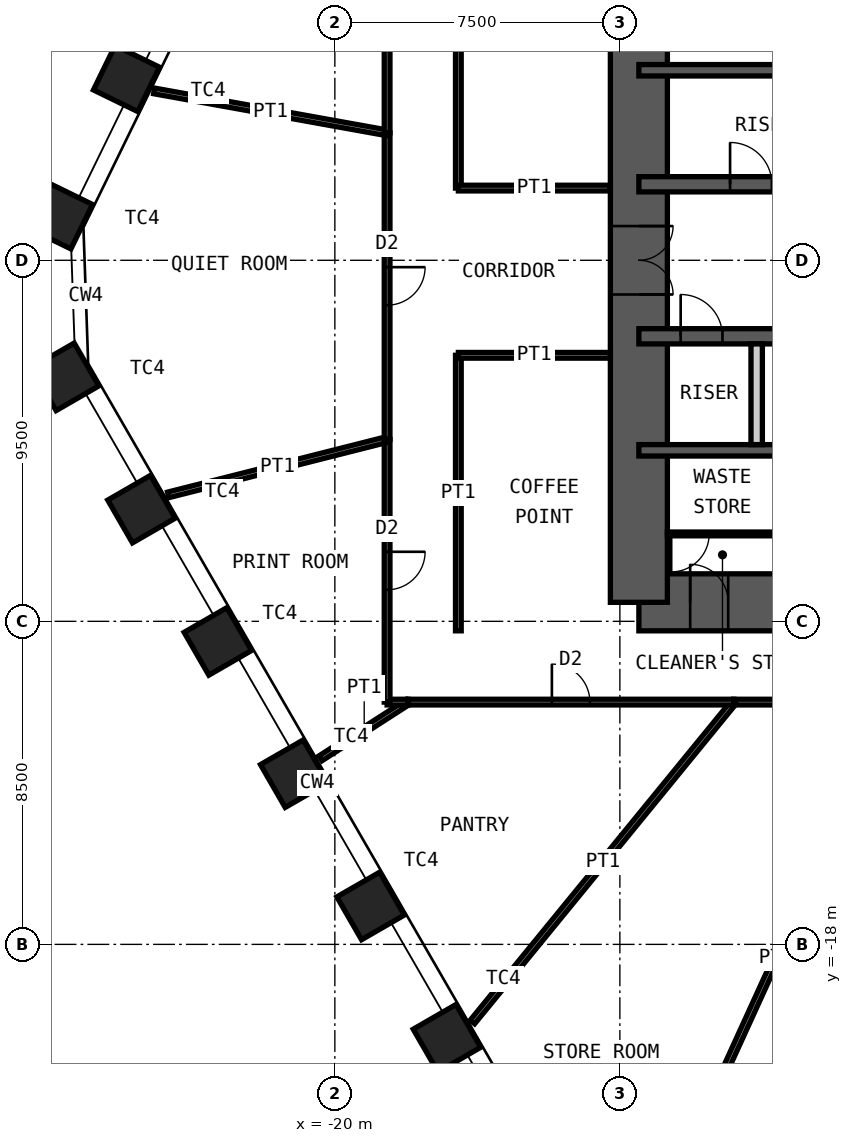
"""IFC4 building model, lengths in metres.
Left out: names, types, materials, properties, quantities, classifications, styles, units other than length and angle.
Written with IfcOpenShell. Run it as: python <this file> out.ifc"""

import sys

from ifc_helpers import new_model, si_unit, direction, frame, frame_2d, origin, origin_2d, place, context, subcontext, project, spatial, rectangle, hollow_rectangle, extrude, element, fill, save


model = new_model("IFC4")
c1 = context("Model", 3, precision=1e-05, world=origin(), true_north=direction((0.0, 1.0)))
c2 = subcontext(c1, "Body", "Model", "MODEL_VIEW")
j1 = project(units=[si_unit("LENGTHUNIT", "METRE"), si_unit("PLANEANGLEUNIT", "RADIAN")], contexts=[c1])
p1 = place(None, origin())
s1 = spatial("IfcSite", under=j1, at=p1, CompositionType="ELEMENT")
p2 = place(p1, origin())
s2 = spatial("IfcBuilding", under=s1, at=p2, CompositionType="ELEMENT")
p3 = place(p2, frame((0.0, 0.0, 157.6)))
s3 = spatial("IfcBuildingStorey", under=s2, at=p3, CompositionType="ELEMENT", Elevation=157.6)
for number, where, z_axis, x_axis in (
    (1, (-17.049, -20.47, 0.0), (0.0, 0.0, 1.0), (0.5, -0.866, 0.0)),
    (2, (-19.059, -16.989, 0.0), (0.0, 0.0, 1.0), (0.5, -0.866, 0.0)),
    (3, (-21.068, -13.509, 0.0), (0.0, 0.0, 1.0), (0.5, -0.866, 0.0)),
    (4, (-23.078, -10.028, 0.0), (0.0, 0.0, 1.0), (0.5, -0.866, 0.0)),
    (5, (-25.087, -6.547, 0.0), (0.0, 0.0, 1.0), (0.5, -0.866, 0.0)),
    (6, (-27.097, -3.067, 0.0), (0.0, 0.0, 1.0), (0.5, -0.866, 0.0)),
    (7, (-27.245, 1.169, 0.0), (0.0, 0.0, 1.0), (-0.438, -0.899, 0.0)),
    (8, (-25.483, 4.781, 0.0), (0.0, 0.0, 1.0), (-0.438, -0.899, 0.0)),
):
    element("IfcColumn", number, at=place(p3, frame(where, z_axis=z_axis, x_axis=x_axis)), inside=s3, PredefinedType="COLUMN", context=c2, shape_type="SweptSolid", body=[
        extrude(hollow_rectangle(XDim=1.3, YDim=1.3, WallThickness=0.1, at=origin_2d()), origin(), (0.0, 0.0, 1.0), 4.2),
    ])
p4 = place(p3, frame((-12.0, -9.0, 0.0), z_axis=(0.0, 0.0, 1.0), x_axis=(1.0, 0.0, 0.0)))
e9 = element("IfcWall", 9, at=p4, inside=s3, PredefinedType="SHEAR", context=c2, shape_type="SweptSolid", body=[
    extrude(rectangle(XDim=24.0, YDim=1.5, at=frame_2d((12.0, 0.0))), origin(), (0.0, 0.0, 1.0), 4.2),
])
p5 = place(p4, frame((1.35, 0.0, 0.0)))
e10 = element("IfcOpeningElement", 10, at=p5, cuts=e9, PredefinedType="OPENING", context=c2, shape_type="SweptSolid", body=[
    extrude(rectangle(XDim=1.0, YDim=2.1, at=frame_2d((0.5, 1.05))), frame((0.0, 0.76, 0.0), z_axis=(0.0, -1.0, 0.0), x_axis=(1.0, 0.0, 0.0)), (0.0, 0.0, 1.0), 1.52),
])
p6 = place(p4, frame((5.325, 0.0, 0.0)))
e11 = element("IfcOpeningElement", 11, at=p6, cuts=e9, PredefinedType="OPENING", context=c2, shape_type="SweptSolid", body=[
    extrude(rectangle(XDim=1.15, YDim=2.1, at=frame_2d((0.575, 1.05))), frame((0.0, 0.76, 0.0), z_axis=(0.0, -1.0, 0.0), x_axis=(1.0, 0.0, 0.0)), (0.0, 0.0, 1.0), 1.52),
])
p7 = place(p4, frame((12.6, 0.0, 0.0)))
e12 = element("IfcOpeningElement", 12, at=p7, cuts=e9, PredefinedType="OPENING", context=c2, shape_type="SweptSolid", body=[
    extrude(rectangle(XDim=1.0, YDim=2.1, at=frame_2d((0.5, 1.05))), frame((0.0, 0.76, 0.0), z_axis=(0.0, -1.0, 0.0), x_axis=(1.0, 0.0, 0.0)), (0.0, 0.0, 1.0), 1.52),
])
p8 = place(p3, frame((-12.0, -9.0, 0.0), z_axis=(0.0, 0.0, 1.0), x_axis=(0.0, 1.0, 0.0)))
e13 = element("IfcWall", 13, at=p8, inside=s3, PredefinedType="SHEAR", context=c2, shape_type="SweptSolid", body=[
    extrude(rectangle(XDim=18.0, YDim=1.5, at=frame_2d((9.0, 0.0))), origin(), (0.0, 0.0, 1.0), 4.2),
])
p9 = place(p8, frame((8.1, 0.0, 0.0)))
e14 = element("IfcOpeningElement", 14, at=p9, cuts=e13, PredefinedType="OPENING", context=c2, shape_type="SweptSolid", body=[
    extrude(rectangle(XDim=1.8, YDim=2.1, at=frame_2d((0.9, 1.05))), frame((0.0, 0.76, 0.0), z_axis=(0.0, -1.0, 0.0), x_axis=(1.0, 0.0, 0.0)), (0.0, 0.0, 1.0), 1.52),
])
p10 = place(p3, frame((-12.0, 5.0, 0.0), z_axis=(0.0, 0.0, 1.0), x_axis=(1.0, 0.0, 0.0)))
e15 = element("IfcWall", 15, at=p10, inside=s3, PredefinedType="SHEAR", context=c2, shape_type="SweptSolid", body=[
    extrude(rectangle(XDim=24.0, YDim=0.3, at=frame_2d((12.0, 0.0))), origin(), (0.0, 0.0, 1.0), 4.2),
])
p11 = place(p3, frame((-12.0, 2.0, 0.0), z_axis=(0.0, 0.0, 1.0), x_axis=(1.0, 0.0, 0.0)))
e16 = element("IfcWall", 16, at=p11, inside=s3, PredefinedType="SHEAR", context=c2, shape_type="SweptSolid", body=[
    extrude(rectangle(XDim=24.0, YDim=0.4, at=frame_2d((12.0, 0.0))), origin(), (0.0, 0.0, 1.0), 4.2),
])
p12 = place(p11, frame((2.4, 0.0, 0.0)))
e17 = element("IfcOpeningElement", 17, at=p12, cuts=e16, PredefinedType="OPENING", context=c2, shape_type="SweptSolid", body=[
    extrude(rectangle(XDim=1.1, YDim=2.1, at=frame_2d((0.55, 1.05))), frame((0.0, 0.21, 0.0), z_axis=(0.0, -1.0, 0.0), x_axis=(1.0, 0.0, 0.0)), (0.0, 0.0, 1.0), 0.42),
])
p13 = place(p11, frame((22.0, 0.0, 0.0)))
e18 = element("IfcOpeningElement", 18, at=p13, cuts=e16, PredefinedType="OPENING", context=c2, shape_type="SweptSolid", body=[
    extrude(rectangle(XDim=1.1, YDim=2.1, at=frame_2d((0.55, 1.05))), frame((0.0, 0.21, 0.0), z_axis=(0.0, -1.0, 0.0), x_axis=(1.0, 0.0, 0.0)), (0.0, 0.0, 1.0), 0.42),
])
p14 = place(p11, frame((10.15, 0.0, 0.0)))
e19 = element("IfcOpeningElement", 19, at=p14, cuts=e16, PredefinedType="OPENING", context=c2, shape_type="SweptSolid", body=[
    extrude(rectangle(XDim=1.0, YDim=2.1, at=frame_2d((0.5, 1.05))), frame((0.0, 0.21, 0.0), z_axis=(0.0, -1.0, 0.0), x_axis=(1.0, 0.0, 0.0)), (0.0, 0.0, 1.0), 0.42),
])
p15 = place(p11, frame((6.9, 0.0, 0.0)))
e20 = element("IfcOpeningElement", 20, at=p15, cuts=e16, PredefinedType="OPENING", context=c2, shape_type="SweptSolid", body=[
    extrude(rectangle(XDim=1.0, YDim=2.1, at=frame_2d((0.5, 1.05))), frame((0.0, 0.21, 0.0), z_axis=(0.0, -1.0, 0.0), x_axis=(1.0, 0.0, 0.0)), (0.0, 0.0, 1.0), 0.42),
])
p16 = place(p11, frame((13.35, 0.0, 0.0)))
e21 = element("IfcOpeningElement", 21, at=p16, cuts=e16, PredefinedType="OPENING", context=c2, shape_type="SweptSolid", body=[
    extrude(rectangle(XDim=1.1, YDim=2.4, at=frame_2d((0.55, 1.2))), frame((0.0, 0.21, 0.0), z_axis=(0.0, -1.0, 0.0), x_axis=(1.0, 0.0, 0.0)), (0.0, 0.0, 1.0), 0.42),
])
p17 = place(p11, frame((16.15, 0.0, 0.0)))
e22 = element("IfcOpeningElement", 22, at=p17, cuts=e16, PredefinedType="OPENING", context=c2, shape_type="SweptSolid", body=[
    extrude(rectangle(XDim=1.1, YDim=2.4, at=frame_2d((0.55, 1.2))), frame((0.0, 0.21, 0.0), z_axis=(0.0, -1.0, 0.0), x_axis=(1.0, 0.0, 0.0)), (0.0, 0.0, 1.0), 0.42),
])
p18 = place(p11, frame((18.95, 0.0, 0.0)))
e23 = element("IfcOpeningElement", 23, at=p18, cuts=e16, PredefinedType="OPENING", context=c2, shape_type="SweptSolid", body=[
    extrude(rectangle(XDim=1.1, YDim=2.4, at=frame_2d((0.55, 1.2))), frame((0.0, 0.21, 0.0), z_axis=(0.0, -1.0, 0.0), x_axis=(1.0, 0.0, 0.0)), (0.0, 0.0, 1.0), 0.42),
])
p19 = place(p3, frame((-12.0, -2.0, 0.0), z_axis=(0.0, 0.0, 1.0), x_axis=(1.0, 0.0, 0.0)))
e24 = element("IfcWall", 24, at=p19, inside=s3, PredefinedType="SHEAR", context=c2, shape_type="SweptSolid", body=[
    extrude(rectangle(XDim=24.0, YDim=0.4, at=frame_2d((12.0, 0.0))), origin(), (0.0, 0.0, 1.0), 4.2),
])
p20 = place(p19, frame((1.1, 0.0, 0.0)))
e25 = element("IfcOpeningElement", 25, at=p20, cuts=e24, PredefinedType="OPENING", context=c2, shape_type="SweptSolid", body=[
    extrude(rectangle(XDim=1.1, YDim=2.1, at=frame_2d((0.55, 1.05))), frame((0.0, 0.21, 0.0), z_axis=(0.0, -1.0, 0.0), x_axis=(1.0, 0.0, 0.0)), (0.0, 0.0, 1.0), 0.42),
])
p21 = place(p19, frame((13.55, 0.0, 0.0)))
e26 = element("IfcOpeningElement", 26, at=p21, cuts=e24, PredefinedType="OPENING", context=c2, shape_type="SweptSolid", body=[
    extrude(rectangle(XDim=1.1, YDim=2.1, at=frame_2d((0.55, 1.05))), frame((0.0, 0.21, 0.0), z_axis=(0.0, -1.0, 0.0), x_axis=(1.0, 0.0, 0.0)), (0.0, 0.0, 1.0), 0.42),
])
p22 = place(p19, frame((20.7, 0.0, 0.0)))
e27 = element("IfcOpeningElement", 27, at=p22, cuts=e24, PredefinedType="OPENING", context=c2, shape_type="SweptSolid", body=[
    extrude(rectangle(XDim=1.1, YDim=2.1, at=frame_2d((0.55, 1.05))), frame((0.0, 0.21, 0.0), z_axis=(0.0, -1.0, 0.0), x_axis=(1.0, 0.0, 0.0)), (0.0, 0.0, 1.0), 0.42),
])
p23 = place(p19, frame((4.0, 0.0, 0.0)))
e28 = element("IfcOpeningElement", 28, at=p23, cuts=e24, PredefinedType="OPENING", context=c2, shape_type="SweptSolid", body=[
    extrude(rectangle(XDim=1.0, YDim=2.1, at=frame_2d((0.5, 1.05))), frame((0.0, 0.21, 0.0), z_axis=(0.0, -1.0, 0.0), x_axis=(1.0, 0.0, 0.0)), (0.0, 0.0, 1.0), 0.42),
])
p24 = place(p3, frame((-12.0, -5.0, 0.0), z_axis=(0.0, 0.0, 1.0), x_axis=(1.0, 0.0, 0.0)))
e29 = element("IfcWall", 29, at=p24, inside=s3, PredefinedType="SHEAR", context=c2, shape_type="SweptSolid", body=[
    extrude(rectangle(XDim=24.0, YDim=0.3, at=frame_2d((12.0, 0.0))), origin(), (0.0, 0.0, 1.0), 4.2),
])
p25 = place(p3, frame((-8.9, -4.85, 0.0), z_axis=(0.0, 0.0, 1.0), x_axis=(0.0, 1.0, 0.0)))
e30 = element("IfcWall", 30, at=p25, inside=s3, PredefinedType="PARTITIONING", context=c2, shape_type="SweptSolid", body=[
    extrude(rectangle(XDim=2.65, YDim=0.3, at=frame_2d((1.325, 0.0))), origin(), (0.0, 0.0, 1.0), 3.98),
])
p26 = place(p3, frame((-11.25, -7.2, 0.0), z_axis=(0.0, 0.0, 1.0), x_axis=(1.0, 0.0, 0.0)))
e31 = element("IfcWall", 31, at=p26, inside=s3, PredefinedType="PARTITIONING", context=c2, shape_type="SweptSolid", body=[
    extrude(rectangle(XDim=2.9, YDim=0.1, at=frame_2d((1.45, 0.0))), origin(), (0.0, 0.0, 1.0), 3.98),
])
p27 = place(p26, frame((0.1, 0.0, 0.0)))
e32 = element("IfcOpeningElement", 32, at=p27, cuts=e31, PredefinedType="OPENING", context=c2, shape_type="SweptSolid", body=[
    extrude(rectangle(XDim=1.0, YDim=2.4, at=frame_2d((0.5, 1.2))), frame((0.0, 0.06, 0.0), z_axis=(0.0, -1.0, 0.0), x_axis=(1.0, 0.0, 0.0)), (0.0, 0.0, 1.0), 0.12),
])
p28 = place(p3, frame((-11.453, -25.072, 0.0), z_axis=(0.0, 0.0, 1.0), x_axis=(0.415494357555, 0.909595755729, 0.0)))
e33 = element("IfcWall", 33, at=p28, inside=s3, PredefinedType="PARTITIONING", context=c2, shape_type="SweptSolid", body=[
    extrude(rectangle(XDim=14.784, YDim=0.15, at=frame_2d((7.392, 0.0))), origin(), (0.0, 0.0, 1.0), 2.93),
])
p29 = place(p3, frame((-5.31, -11.625, 0.0), z_axis=(0.0, 0.0, 1.0), x_axis=(-1.0, 0.0, 0.0)))
e34 = element("IfcWall", 34, at=p29, inside=s3, PredefinedType="PARTITIONING", context=c2, shape_type="SweptSolid", body=[
    extrude(rectangle(XDim=4.19, YDim=0.15, at=frame_2d((2.095, 0.0))), origin(), (0.0, 0.0, 1.0), 4.03),
])
p30 = place(p29, frame((1.595, 0.0, 0.0)))
e35 = element("IfcOpeningElement", 35, at=p30, cuts=e34, PredefinedType="OPENING", context=c2, shape_type="SweptSolid", body=[
    extrude(rectangle(XDim=1.0, YDim=2.4, at=frame_2d((0.5, 1.2))), frame((0.0, 0.085, 0.0), z_axis=(0.0, -1.0, 0.0), x_axis=(1.0, 0.0, 0.0)), (0.0, 0.0, 1.0), 0.17),
])
p31 = place(p3, frame((-16.38, -20.042, 0.0), z_axis=(0.0, 0.0, 1.0), x_axis=(0.632814540967, 0.774303400962, 0.0)))
e36 = element("IfcWall", 36, at=p31, inside=s3, PredefinedType="PARTITIONING", context=c2, shape_type="SweptSolid", body=[
    extrude(rectangle(XDim=10.871, YDim=0.15, at=frame_2d((5.435, 0.0))), origin(), (0.0, 0.0, 1.0), 3.33),
])
p32 = place(p3, frame((-9.501, -11.625, 0.0), z_axis=(0.0, 0.0, 1.0), x_axis=(-1.0, 0.0, 0.0)))
e37 = element("IfcWall", 37, at=p32, inside=s3, PredefinedType="PARTITIONING", context=c2, shape_type="SweptSolid", body=[
    extrude(rectangle(XDim=8.577, YDim=0.15, at=frame_2d((4.288, 0.0))), origin(), (0.0, 0.0, 1.0), 4.03),
])
p33 = place(p32, frame((3.788, 0.0, 0.0)))
e38 = element("IfcOpeningElement", 38, at=p33, cuts=e37, PredefinedType="OPENING", context=c2, shape_type="SweptSolid", body=[
    extrude(rectangle(XDim=1.0, YDim=2.4, at=frame_2d((0.5, 1.2))), frame((0.0, 0.085, 0.0), z_axis=(0.0, -1.0, 0.0), x_axis=(1.0, 0.0, 0.0)), (0.0, 0.0, 1.0), 0.17),
])
p34 = place(p3, frame((-20.378, -13.104, 0.0), z_axis=(0.0, 0.0, 1.0), x_axis=(0.841108871346, 0.540865848934, 0.0)))
e39 = element("IfcWall", 39, at=p34, inside=s3, PredefinedType="PARTITIONING", context=c2, shape_type="SweptSolid", body=[
    extrude(rectangle(XDim=2.735, YDim=0.15, at=frame_2d((1.368, 0.0))), origin(), (0.0, 0.0, 1.0), 3.33),
])
p35 = place(p3, frame((-18.077, -11.625, 0.0), z_axis=(0.0, 0.0, 1.0), x_axis=(-1.0, 0.0, 0.0)))
e40 = element("IfcWall", 40, at=p35, inside=s3, PredefinedType="PARTITIONING", context=c2, shape_type="SweptSolid", body=[
    extrude(rectangle(XDim=0.548, YDim=0.15, at=frame_2d((0.274, 0.0))), origin(), (0.0, 0.0, 1.0), 4.03),
])
p36 = place(p3, frame((-18.625, -11.625, 0.0), z_axis=(0.0, 0.0, 1.0), x_axis=(0.0, 1.0, 0.0)))
e41 = element("IfcWall", 41, at=p36, inside=s3, PredefinedType="PARTITIONING", context=c2, shape_type="SweptSolid", body=[
    extrude(rectangle(XDim=6.91, YDim=0.15, at=frame_2d((3.455, 0.0))), origin(), (0.0, 0.0, 1.0), 4.03),
])
p37 = place(p36, frame((2.955, 0.0, 0.0)))
e42 = element("IfcOpeningElement", 42, at=p37, cuts=e41, PredefinedType="OPENING", context=c2, shape_type="SweptSolid", body=[
    extrude(rectangle(XDim=1.0, YDim=2.4, at=frame_2d((0.5, 1.2))), frame((0.0, 0.085, 0.0), z_axis=(0.0, -1.0, 0.0), x_axis=(1.0, 0.0, 0.0)), (0.0, 0.0, 1.0), 0.17),
])
p38 = place(p3, frame((-24.384, -6.173, 0.0), z_axis=(0.0, 0.0, 1.0), x_axis=(0.969427635767, 0.245377380804, 0.0)))
e43 = element("IfcWall", 43, at=p38, inside=s3, PredefinedType="PARTITIONING", context=c2, shape_type="SweptSolid", body=[
    extrude(rectangle(XDim=5.941, YDim=0.15, at=frame_2d((2.97, 0.0))), origin(), (0.0, 0.0, 1.0), 3.33),
])
p39 = place(p3, frame((-18.625, -4.715, 0.0), z_axis=(0.0, 0.0, 1.0), x_axis=(0.0, 1.0, 0.0)))
e44 = element("IfcWall", 44, at=p39, inside=s3, PredefinedType="PARTITIONING", context=c2, shape_type="SweptSolid", body=[
    extrude(rectangle(XDim=8.068, YDim=0.15, at=frame_2d((4.034, 0.0))), origin(), (0.0, 0.0, 1.0), 4.03),
])
p40 = place(p39, frame((3.534, 0.0, 0.0)))
e45 = element("IfcOpeningElement", 45, at=p40, cuts=e44, PredefinedType="OPENING", context=c2, shape_type="SweptSolid", body=[
    extrude(rectangle(XDim=1.0, YDim=2.4, at=frame_2d((0.5, 1.2))), frame((0.0, 0.085, 0.0), z_axis=(0.0, -1.0, 0.0), x_axis=(1.0, 0.0, 0.0)), (0.0, 0.0, 1.0), 0.17),
])
p41 = place(p3, frame((-24.755, 4.457, 0.0), z_axis=(0.0, 0.0, 1.0), x_axis=(0.984175122587, -0.177198555524, 0.0)))
e46 = element("IfcWall", 46, at=p41, inside=s3, PredefinedType="PARTITIONING", context=c2, shape_type="SweptSolid", body=[
    extrude(rectangle(XDim=6.229, YDim=0.15, at=frame_2d((3.115, 0.0))), origin(), (0.0, 0.0, 1.0), 3.33),
])
p42 = place(p3, frame((-18.625, 3.353, 0.0), z_axis=(0.0, 0.0, 1.0), x_axis=(0.0, 1.0, 0.0)))
e47 = element("IfcWall", 47, at=p42, inside=s3, PredefinedType="PARTITIONING", context=c2, shape_type="SweptSolid", body=[
    extrude(rectangle(XDim=8.272, YDim=0.15, at=frame_2d((4.136, 0.0))), origin(), (0.0, 0.0, 1.0), 4.03),
])
p43 = place(p42, frame((3.236, 0.0, 0.0)))
e48 = element("IfcOpeningElement", 48, at=p43, cuts=e47, PredefinedType="OPENING", context=c2, shape_type="SweptSolid", body=[
    extrude(rectangle(XDim=1.8, YDim=2.4, at=frame_2d((0.9, 1.2))), frame((0.0, 0.085, 0.0), z_axis=(0.0, -1.0, 0.0), x_axis=(1.0, 0.0, 0.0)), (0.0, 0.0, 1.0), 0.17),
])
p44 = place(p3, frame((-16.75, 1.9, 0.0), z_axis=(0.0, 0.0, 1.0), x_axis=(0.0, 1.0, 0.0)))
e49 = element("IfcWall", 49, at=p44, inside=s3, PredefinedType="PARTITIONING", context=c2, shape_type="SweptSolid", body=[
    extrude(rectangle(XDim=7.85, YDim=0.15, at=frame_2d((3.925, 0.0))), origin(), (0.0, 0.0, 1.0), 4.03),
])
p45 = place(p3, frame((-12.75, 1.9, 0.0), z_axis=(0.0, 0.0, 1.0), x_axis=(-1.0, 0.0, 0.0)))
e50 = element("IfcWall", 50, at=p45, inside=s3, PredefinedType="PARTITIONING", context=c2, shape_type="SweptSolid", body=[
    extrude(rectangle(XDim=4.0, YDim=0.15, at=frame_2d((2.0, 0.0))), origin(), (0.0, 0.0, 1.0), 3.33),
])
p46 = place(p3, frame((-16.75, -9.75, 0.0), z_axis=(0.0, 0.0, 1.0), x_axis=(0.0, 1.0, 0.0)))
e51 = element("IfcWall", 51, at=p46, inside=s3, PredefinedType="PARTITIONING", context=c2, shape_type="SweptSolid", body=[
    extrude(rectangle(XDim=7.25, YDim=0.15, at=frame_2d((3.625, 0.0))), origin(), (0.0, 0.0, 1.0), 4.03),
])
p47 = place(p3, frame((-12.75, -2.5, 0.0), z_axis=(0.0, 0.0, 1.0), x_axis=(-1.0, 0.0, 0.0)))
e52 = element("IfcWall", 52, at=p47, inside=s3, PredefinedType="PARTITIONING", context=c2, shape_type="SweptSolid", body=[
    extrude(rectangle(XDim=4.0, YDim=0.15, at=frame_2d((2.0, 0.0))), origin(), (0.0, 0.0, 1.0), 3.33),
])
p48 = place(p5, origin())
e53 = element("IfcDoor", 53, at=p48, inside=s3, OperationType="SINGLE_SWING_RIGHT", PredefinedType="DOOR", context=c2, shape_type="SweptSolid", body=[
    extrude(rectangle(XDim=1.0, YDim=2.1, at=frame_2d((0.5, 1.05))), frame((0.0, 0.025, 0.0), z_axis=(0.0, -1.0, 0.0), x_axis=(1.0, 0.0, 0.0)), (0.0, 0.0, 1.0), 0.05),
])
fill(e10, e53)
p49 = place(p12, origin())
e54 = element("IfcDoor", 54, at=p49, inside=s3, OperationType="SINGLE_SWING_RIGHT", PredefinedType="DOOR", context=c2, shape_type="SweptSolid", body=[
    extrude(rectangle(XDim=1.1, YDim=2.1, at=frame_2d((0.55, 1.05))), frame((0.0, 0.025, 0.0), z_axis=(0.0, -1.0, 0.0), x_axis=(1.0, 0.0, 0.0)), (0.0, 0.0, 1.0), 0.05),
])
fill(e17, e54)
p50 = place(p20, origin())
e55 = element("IfcDoor", 55, at=p50, inside=s3, OperationType="SINGLE_SWING_RIGHT", PredefinedType="DOOR", context=c2, shape_type="SweptSolid", body=[
    extrude(rectangle(XDim=1.1, YDim=2.1, at=frame_2d((0.55, 1.05))), frame((0.0, 0.025, 0.0), z_axis=(0.0, -1.0, 0.0), x_axis=(1.0, 0.0, 0.0)), (0.0, 0.0, 1.0), 0.05),
])
fill(e25, e55)
p51 = place(p9, origin())
e56 = element("IfcDoor", 56, at=p51, inside=s3, OperationType="DOUBLE_DOOR_DOUBLE_SWING", PredefinedType="DOOR", context=c2, shape_type="SweptSolid", body=[
    extrude(rectangle(XDim=1.8, YDim=2.1, at=frame_2d((0.9, 1.05))), frame((0.0, 0.025, 0.0), z_axis=(0.0, -1.0, 0.0), x_axis=(1.0, 0.0, 0.0)), (0.0, 0.0, 1.0), 0.05),
])
fill(e14, e56)
p52 = place(p27, origin())
e57 = element("IfcDoor", 57, at=p52, inside=s3, OperationType="SINGLE_SWING_LEFT", PredefinedType="DOOR", context=c2, shape_type="SweptSolid", body=[
    extrude(rectangle(XDim=1.0, YDim=2.4, at=frame_2d((0.5, 1.2))), frame((0.0, 0.025, 0.0), z_axis=(0.0, -1.0, 0.0), x_axis=(1.0, 0.0, 0.0)), (0.0, 0.0, 1.0), 0.05),
])
fill(e32, e57)
p53 = place(p33, origin())
e58 = element("IfcDoor", 58, at=p53, inside=s3, OperationType="SINGLE_SWING_RIGHT", PredefinedType="DOOR", context=c2, shape_type="SweptSolid", body=[
    extrude(rectangle(XDim=1.0, YDim=2.4, at=frame_2d((0.5, 1.2))), frame((0.0, 0.025, 0.0), z_axis=(0.0, -1.0, 0.0), x_axis=(1.0, 0.0, 0.0)), (0.0, 0.0, 1.0), 0.05),
])
fill(e38, e58)
p54 = place(p37, origin())
e59 = element("IfcDoor", 59, at=p54, inside=s3, OperationType="SINGLE_SWING_RIGHT", PredefinedType="DOOR", context=c2, shape_type="SweptSolid", body=[
    extrude(rectangle(XDim=1.0, YDim=2.4, at=frame_2d((0.5, 1.2))), frame((0.0, 0.025, 0.0), z_axis=(0.0, -1.0, 0.0), x_axis=(1.0, 0.0, 0.0)), (0.0, 0.0, 1.0), 0.05),
])
fill(e42, e59)
p55 = place(p40, origin())
e60 = element("IfcDoor", 60, at=p55, inside=s3, OperationType="SINGLE_SWING_RIGHT", PredefinedType="DOOR", context=c2, shape_type="SweptSolid", body=[
    extrude(rectangle(XDim=1.0, YDim=2.4, at=frame_2d((0.5, 1.2))), frame((0.0, 0.025, 0.0), z_axis=(0.0, -1.0, 0.0), x_axis=(1.0, 0.0, 0.0)), (0.0, 0.0, 1.0), 0.05),
])
fill(e45, e60)
save(model, sys.argv[1])
